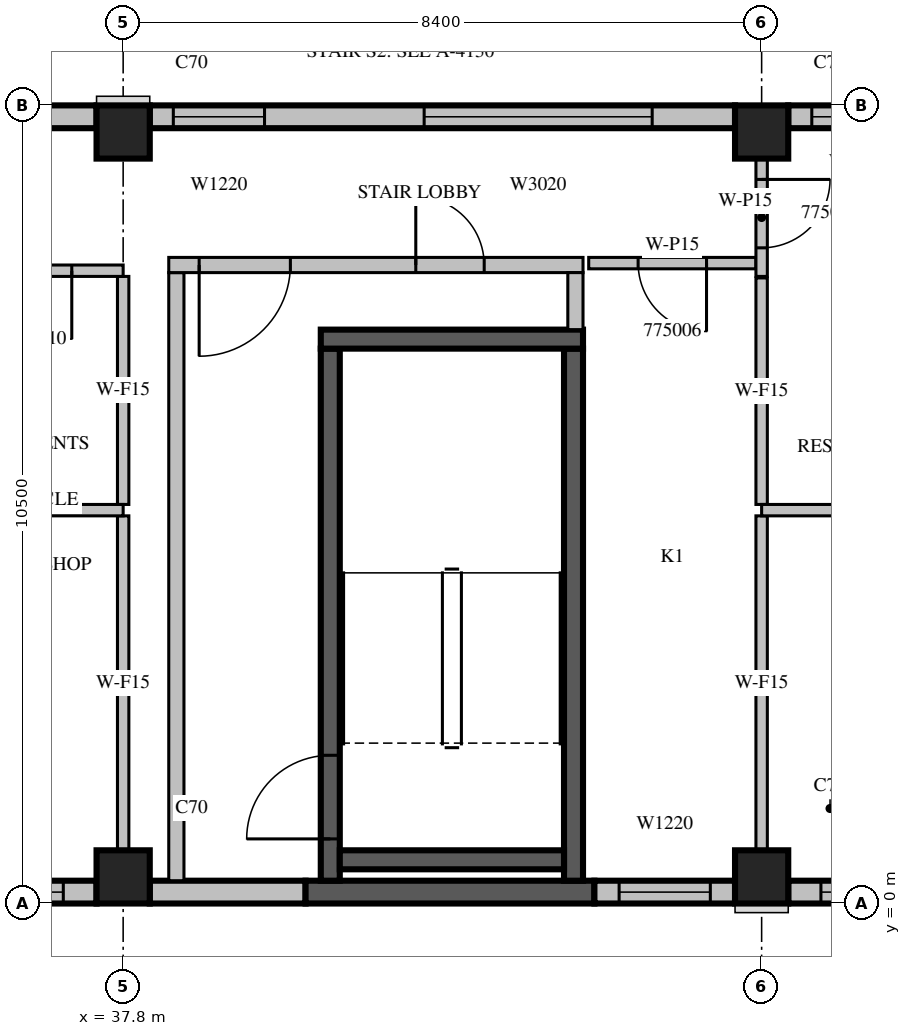
"""IFC4 building model, lengths in metres.
Left out: names, types, materials, properties, quantities, classifications, styles, units other than length and angle.
Written with IfcOpenShell. Run it as: python <this file> out.ifc"""

import sys

from ifc_helpers import new_model, si_unit, direction, frame, frame_2d, origin, origin_2d, place, context, subcontext, project, spatial, rectangle, extrude, source, transform, mapped, element, fill, save


model = new_model("IFC4")
c1 = context("Model", 3, precision=1e-05, world=origin(), true_north=direction((0.0, 1.0)))
c2 = subcontext(c1, "Body", "Model", "MODEL_VIEW")
j1 = project(units=[si_unit("LENGTHUNIT", "METRE"), si_unit("PLANEANGLEUNIT", "RADIAN")], contexts=[c1])
p1 = place(None, origin())
s1 = spatial("IfcSite", under=j1, at=p1, CompositionType="ELEMENT")
p2 = place(p1, origin())
s2 = spatial("IfcBuilding", under=s1, at=p2, CompositionType="ELEMENT")
p3 = place(p2, frame((0.0, 0.0, 323.0)))
s3 = spatial("IfcBuildingStorey", under=s2, at=p3, CompositionType="ELEMENT", Elevation=323.0)
m1 = source(origin(), c2, "Body", "SweptSolid", [
    extrude(rectangle(XDim=0.7, YDim=0.7, at=origin_2d()), origin(), (0.0, 0.0, 1.0), 3.5),
])
for number, where, z_axis, x_axis in (
    (1, (37.8, 0.35, 0.0), (0.0, 0.0, 1.0), (1.0, 0.0, 0.0)),
    (2, (46.2, 0.35, 0.0), (0.0, 0.0, 1.0), (1.0, 0.0, 0.0)),
    (3, (37.8, 10.15, 0.0), (0.0, 0.0, 1.0), (1.0, 0.0, 0.0)),
    (4, (46.2, 10.15, 0.0), (0.0, 0.0, 1.0), (1.0, 0.0, 0.0)),
):
    element("IfcColumn", number, at=place(p3, frame(where, z_axis=z_axis, x_axis=x_axis)), inside=s3, PredefinedType="COLUMN", context=c2, shape_type="MappedRepresentation", body=[
        mapped(m1, transform((0.0, 0.0, 0.0), scale=1.0)),
    ])
m2 = source(origin(), c2, "Body", "SweptSolid", [
    extrude(rectangle(XDim=7.7, YDim=0.3, at=frame_2d((3.85, 0.0))), origin(), (0.0, 0.0, 1.0), 3.1),
])
p4 = place(p3, frame((29.75, 0.15, 0.0), z_axis=(0.0, 0.0, 1.0), x_axis=(1.0, 0.0, 0.0)))
e5 = element("IfcWall", 5, at=p4, inside=s3, PredefinedType="STANDARD", context=c2, shape_type="MappedRepresentation", body=[
    mapped(m2, transform((0.0, 0.0, 0.0), scale=1.0)),
])
m3 = source(origin(), c2, "Body", "SweptSolid", [
    extrude(rectangle(XDim=1.2, YDim=2.0, at=frame_2d((0.6, 1.0))), frame((0.0, 0.16, 0.0), z_axis=(0.0, -1.0, 0.0), x_axis=(1.0, 0.0, 0.0)), (0.0, 0.0, 1.0), 0.32),
])
p5 = place(p4, frame((0.537, 0.0, 0.6)))
e6 = element("IfcOpeningElement", 6, at=p5, cuts=e5, PredefinedType="OPENING", context=c2, shape_type="MappedRepresentation", body=[
    mapped(m3, transform((0.0, 0.0, 0.0), scale=1.0)),
])
p6 = place(p4, frame((6.062, 0.0, 0.6)))
e7 = element("IfcOpeningElement", 7, at=p6, cuts=e5, PredefinedType="OPENING", context=c2, shape_type="MappedRepresentation", body=[
    mapped(m3, transform((0.0, 0.0, 0.0), scale=1.0)),
])
m4 = source(origin(), c2, "Body", "SweptSolid", [
    extrude(rectangle(XDim=2.4, YDim=2.0, at=frame_2d((1.2, 1.0))), frame((0.0, 0.16, 0.0), z_axis=(0.0, -1.0, 0.0), x_axis=(1.0, 0.0, 0.0)), (0.0, 0.0, 1.0), 0.32),
])
p7 = place(p4, frame((2.7, 0.0, 0.6)))
e8 = element("IfcOpeningElement", 8, at=p7, cuts=e5, PredefinedType="OPENING", context=c2, shape_type="MappedRepresentation", body=[
    mapped(m4, transform((0.0, 0.0, 0.0), scale=1.0)),
])
m5 = source(origin(), c2, "Body", "SweptSolid", [
    extrude(rectangle(XDim=2.05, YDim=0.3, at=frame_2d((1.025, 0.0))), origin(), (0.0, 0.0, 1.0), 3.1),
])
p8 = place(p3, frame((38.15, 0.15, 0.0), z_axis=(0.0, 0.0, 1.0), x_axis=(1.0, 0.0, 0.0)))
e9 = element("IfcWall", 9, at=p8, inside=s3, PredefinedType="STANDARD", context=c2, shape_type="MappedRepresentation", body=[
    mapped(m5, transform((0.0, 0.0, 0.0), scale=1.0)),
])
m6 = source(origin(), c2, "Body", "SweptSolid", [
    extrude(rectangle(XDim=3.8, YDim=0.3, at=frame_2d((1.9, 0.0))), origin(), (0.0, 0.0, 1.0), 3.1),
])
p9 = place(p3, frame((40.2, 0.15, 0.0), z_axis=(0.0, 0.0, 1.0), x_axis=(1.0, 0.0, 0.0)))
e10 = element("IfcWall", 10, at=p9, inside=s3, PredefinedType="SOLIDWALL", context=c2, shape_type="MappedRepresentation", body=[
    mapped(m6, transform((0.0, 0.0, 0.0), scale=1.0)),
])
m7 = source(origin(), c2, "Body", "SweptSolid", [
    extrude(rectangle(XDim=1.85, YDim=0.3, at=frame_2d((0.925, 0.0))), origin(), (0.0, 0.0, 1.0), 3.1),
])
p10 = place(p3, frame((44.0, 0.15, 0.0), z_axis=(0.0, 0.0, 1.0), x_axis=(1.0, 0.0, 0.0)))
e11 = element("IfcWall", 11, at=p10, inside=s3, PredefinedType="STANDARD", context=c2, shape_type="MappedRepresentation", body=[
    mapped(m7, transform((0.0, 0.0, 0.0), scale=1.0)),
])
p11 = place(p10, frame((0.325, 0.0, 0.6)))
e12 = element("IfcOpeningElement", 12, at=p11, cuts=e11, PredefinedType="OPENING", context=c2, shape_type="MappedRepresentation", body=[
    mapped(m3, transform((0.0, 0.0, 0.0), scale=1.0)),
])
m8 = source(origin(), c2, "Body", "SweptSolid", [
    extrude(rectangle(XDim=3.01, YDim=0.3, at=frame_2d((1.505, 0.0))), origin(), (0.0, 0.0, 1.0), 3.1),
])
p12 = place(p3, frame((46.55, 0.15, 0.0), z_axis=(0.0, 0.0, 1.0), x_axis=(1.0, 0.0, 0.0)))
e13 = element("IfcWall", 13, at=p12, inside=s3, PredefinedType="STANDARD", context=c2, shape_type="MappedRepresentation", body=[
    mapped(m8, transform((0.0, 0.0, 0.0), scale=1.0)),
])
m9 = source(origin(), c2, "Body", "SweptSolid", [
    extrude(rectangle(XDim=1.8, YDim=2.0, at=frame_2d((0.9, 1.0))), frame((0.0, 0.16, 0.0), z_axis=(0.0, -1.0, 0.0), x_axis=(1.0, 0.0, 0.0)), (0.0, 0.0, 1.0), 0.32),
])
p13 = place(p12, frame((0.43, 0.0, 0.6)))
e14 = element("IfcOpeningElement", 14, at=p13, cuts=e13, PredefinedType="OPENING", context=c2, shape_type="MappedRepresentation", body=[
    mapped(m9, transform((0.0, 0.0, 0.0), scale=1.0)),
])
p14 = place(p3, frame((49.56, 10.35, 0.0), z_axis=(0.0, 0.0, 1.0), x_axis=(-1.0, 0.0, 0.0)))
e15 = element("IfcWall", 15, at=p14, inside=s3, PredefinedType="STANDARD", context=c2, shape_type="MappedRepresentation", body=[
    mapped(m8, transform((0.0, 0.0, 0.0), scale=1.0)),
])
p15 = place(p14, frame((1.5, 0.0, 0.6)))
e16 = element("IfcOpeningElement", 16, at=p15, cuts=e15, PredefinedType="OPENING", context=c2, shape_type="MappedRepresentation", body=[
    mapped(m3, transform((0.0, 0.0, 0.0), scale=1.0)),
])
p16 = place(p3, frame((45.85, 10.35, 0.0), z_axis=(0.0, 0.0, 1.0), x_axis=(-1.0, 0.0, 0.0)))
e17 = element("IfcWall", 17, at=p16, inside=s3, PredefinedType="STANDARD", context=c2, shape_type="MappedRepresentation", body=[
    mapped(m2, transform((0.0, 0.0, 0.0), scale=1.0)),
])
m10 = source(origin(), c2, "Body", "SweptSolid", [
    extrude(rectangle(XDim=3.0, YDim=2.0, at=frame_2d((1.5, 1.0))), frame((0.0, 0.16, 0.0), z_axis=(0.0, -1.0, 0.0), x_axis=(1.0, 0.0, 0.0)), (0.0, 0.0, 1.0), 0.32),
])
p17 = place(p16, frame((1.09, 0.0, 0.6)))
e18 = element("IfcOpeningElement", 18, at=p17, cuts=e17, PredefinedType="OPENING", context=c2, shape_type="MappedRepresentation", body=[
    mapped(m10, transform((0.0, 0.0, 0.0), scale=1.0)),
])
p18 = place(p16, frame((6.19, 0.0, 0.6)))
e19 = element("IfcOpeningElement", 19, at=p18, cuts=e17, PredefinedType="OPENING", context=c2, shape_type="MappedRepresentation", body=[
    mapped(m3, transform((0.0, 0.0, 0.0), scale=1.0)),
])
p19 = place(p3, frame((37.45, 10.35, 0.0), z_axis=(0.0, 0.0, 1.0), x_axis=(-1.0, 0.0, 0.0)))
e20 = element("IfcWall", 20, at=p19, inside=s3, PredefinedType="STANDARD", context=c2, shape_type="MappedRepresentation", body=[
    mapped(m2, transform((0.0, 0.0, 0.0), scale=1.0)),
])
p20 = place(p19, frame((1.09, 0.0, 0.6)))
e21 = element("IfcOpeningElement", 21, at=p20, cuts=e20, PredefinedType="OPENING", context=c2, shape_type="MappedRepresentation", body=[
    mapped(m10, transform((0.0, 0.0, 0.0), scale=1.0)),
])
p21 = place(p19, frame((6.19, 0.0, 0.6)))
e22 = element("IfcOpeningElement", 22, at=p21, cuts=e20, PredefinedType="OPENING", context=c2, shape_type="MappedRepresentation", body=[
    mapped(m3, transform((0.0, 0.0, 0.0), scale=1.0)),
])
m11 = source(origin(), c2, "Body", "SweptSolid", [
    extrude(rectangle(XDim=7.0, YDim=0.25, at=frame_2d((3.5, 0.0))), origin(), (0.0, 0.0, 1.0), 3.1),
])
p22 = place(p3, frame((40.525, 0.3, 0.0), z_axis=(0.0, 0.0, 1.0), x_axis=(0.0, 1.0, 0.0)))
e23 = element("IfcWall", 23, at=p22, inside=s3, PredefinedType="SOLIDWALL", context=c2, shape_type="MappedRepresentation", body=[
    mapped(m11, transform((0.0, 0.0, 0.0), scale=1.0)),
])
m12 = source(origin(), c2, "Body", "SweptSolid", [
    extrude(rectangle(XDim=1.1, YDim=2.1, at=frame_2d((0.55, 1.05))), frame((0.0, 0.135, 0.0), z_axis=(0.0, -1.0, 0.0), x_axis=(1.0, 0.0, 0.0)), (0.0, 0.0, 1.0), 0.27),
])
p23 = place(p22, frame((0.55, 0.0, 0.0)))
e24 = element("IfcOpeningElement", 24, at=p23, cuts=e23, PredefinedType="OPENING", context=c2, shape_type="MappedRepresentation", body=[
    mapped(m12, transform((0.0, 0.0, 0.0), scale=1.0)),
])
p24 = place(p3, frame((43.725, 0.3, 0.0), z_axis=(0.0, 0.0, 1.0), x_axis=(0.0, 1.0, 0.0)))
e25 = element("IfcWall", 25, at=p24, inside=s3, PredefinedType="SOLIDWALL", context=c2, shape_type="MappedRepresentation", body=[
    mapped(m11, transform((0.0, 0.0, 0.0), scale=1.0)),
])
m13 = source(origin(), c2, "Body", "SweptSolid", [
    extrude(rectangle(XDim=3.45, YDim=0.25, at=frame_2d((1.725, 0.0))), origin(), (0.0, 0.0, 1.0), 3.1),
])
p25 = place(p3, frame((40.4, 7.425, 0.0), z_axis=(0.0, 0.0, 1.0), x_axis=(1.0, 0.0, 0.0)))
e26 = element("IfcWall", 26, at=p25, inside=s3, PredefinedType="SOLIDWALL", context=c2, shape_type="MappedRepresentation", body=[
    mapped(m13, transform((0.0, 0.0, 0.0), scale=1.0)),
])
m14 = source(origin(), c2, "Body", "SweptSolid", [
    extrude(rectangle(XDim=2.95, YDim=0.25, at=frame_2d((1.475, 0.0))), origin(), (0.0, 0.0, 1.0), 3.1),
])
p26 = place(p3, frame((40.65, 0.575, 0.0), z_axis=(0.0, 0.0, 1.0), x_axis=(1.0, 0.0, 0.0)))
e27 = element("IfcWall", 27, at=p26, inside=s3, PredefinedType="SOLIDWALL", context=c2, shape_type="MappedRepresentation", body=[
    mapped(m14, transform((0.0, 0.0, 0.0), scale=1.0)),
])
m15 = source(origin(), c2, "Body", "SweptSolid", [
    extrude(rectangle(XDim=8.0, YDim=0.2, at=frame_2d((4.0, 0.0))), origin(), (0.0, 0.0, 1.0), 3.1),
])
p27 = place(p3, frame((38.5, 0.3, 0.0), z_axis=(0.0, 0.0, 1.0), x_axis=(0.0, 1.0, 0.0)))
e28 = element("IfcWall", 28, at=p27, inside=s3, PredefinedType="PARTITIONING", context=c2, shape_type="MappedRepresentation", body=[
    mapped(m15, transform((0.0, 0.0, 0.0), scale=1.0)),
])
m16 = source(origin(), c2, "Body", "SweptSolid", [
    extrude(rectangle(XDim=5.45, YDim=0.2, at=frame_2d((2.725, 0.0))), origin(), (0.0, 0.0, 1.0), 3.1),
])
p28 = place(p3, frame((38.4, 8.4, 0.0), z_axis=(0.0, 0.0, 1.0), x_axis=(1.0, 0.0, 0.0)))
e29 = element("IfcWall", 29, at=p28, inside=s3, PredefinedType="PARTITIONING", context=c2, shape_type="MappedRepresentation", body=[
    mapped(m16, transform((0.0, 0.0, 0.0), scale=1.0)),
])
m17 = source(origin(), c2, "Body", "SweptSolid", [
    extrude(rectangle(XDim=1.2, YDim=2.1, at=frame_2d((0.6, 1.05))), frame((0.0, 0.11, 0.0), z_axis=(0.0, -1.0, 0.0), x_axis=(1.0, 0.0, 0.0)), (0.0, 0.0, 1.0), 0.22),
])
p29 = place(p28, frame((0.4, 0.0, 0.0)))
e30 = element("IfcOpeningElement", 30, at=p29, cuts=e29, PredefinedType="OPENING", context=c2, shape_type="MappedRepresentation", body=[
    mapped(m17, transform((0.0, 0.0, 0.0), scale=1.0)),
])
m18 = source(origin(), c2, "Body", "SweptSolid", [
    extrude(rectangle(XDim=0.9, YDim=2.1, at=frame_2d((0.45, 1.05))), frame((0.0, 0.11, 0.0), z_axis=(0.0, -1.0, 0.0), x_axis=(1.0, 0.0, 0.0)), (0.0, 0.0, 1.0), 0.22),
])
p30 = place(p28, frame((3.25, 0.0, 0.0)))
e31 = element("IfcOpeningElement", 31, at=p30, cuts=e29, PredefinedType="OPENING", context=c2, shape_type="MappedRepresentation", body=[
    mapped(m18, transform((0.0, 0.0, 0.0), scale=1.0)),
])
m19 = source(origin(), c2, "Body", "SweptSolid", [
    extrude(rectangle(XDim=0.75, YDim=0.2, at=frame_2d((0.375, 0.0))), origin(), (0.0, 0.0, 1.0), 3.1),
])
p31 = place(p3, frame((43.75, 7.55, 0.0), z_axis=(0.0, 0.0, 1.0), x_axis=(0.0, 1.0, 0.0)))
e32 = element("IfcWall", 32, at=p31, inside=s3, PredefinedType="PARTITIONING", context=c2, shape_type="MappedRepresentation", body=[
    mapped(m19, transform((0.0, 0.0, 0.0), scale=1.0)),
])
m20 = source(origin(), c2, "Body", "SweptSolid", [
    extrude(rectangle(XDim=2.2, YDim=0.15, at=frame_2d((1.1, 0.0))), origin(), (0.0, 0.0, 1.0), 3.1),
])
p32 = place(p3, frame((46.125, 8.425, 0.0), z_axis=(0.0, 0.0, 1.0), x_axis=(-1.0, 0.0, 0.0)))
e33 = element("IfcWall", 33, at=p32, inside=s3, PredefinedType="PARTITIONING", context=c2, shape_type="MappedRepresentation", body=[
    mapped(m20, transform((0.0, 0.0, 0.0), scale=1.0)),
])
m21 = source(origin(), c2, "Body", "SweptSolid", [
    extrude(rectangle(XDim=0.9, YDim=2.1, at=frame_2d((0.45, 1.05))), frame((0.0, 0.085, 0.0), z_axis=(0.0, -1.0, 0.0), x_axis=(1.0, 0.0, 0.0)), (0.0, 0.0, 1.0), 0.17),
])
p33 = place(p32, frame((0.65, 0.0, 0.0)))
e34 = element("IfcOpeningElement", 34, at=p33, cuts=e33, PredefinedType="OPENING", context=c2, shape_type="MappedRepresentation", body=[
    mapped(m21, transform((0.0, 0.0, 0.0), scale=1.0)),
])
m22 = source(origin(), c2, "Body", "SweptSolid", [
    extrude(rectangle(XDim=4.401, YDim=0.15, at=frame_2d((2.2, 0.0))), origin(), (0.0, 0.0, 1.0), 3.1),
])
p34 = place(p3, frame((37.8, 0.699, 0.0), z_axis=(0.0, 0.0, 1.0), x_axis=(0.0, 1.0, 0.0)))
e35 = element("IfcWall", 35, at=p34, inside=s3, PredefinedType="PARTITIONING", context=c2, shape_type="MappedRepresentation", body=[
    mapped(m22, transform((0.0, 0.0, 0.0), scale=1.0)),
])
m23 = source(origin(), c2, "Body", "SweptSolid", [
    extrude(rectangle(XDim=3.0, YDim=0.15, at=frame_2d((1.5, 0.0))), origin(), (0.0, 0.0, 1.0), 3.1),
])
p35 = place(p3, frame((37.8, 5.25, 0.0), z_axis=(0.0, 0.0, 1.0), x_axis=(0.0, 1.0, 0.0)))
e36 = element("IfcWall", 36, at=p35, inside=s3, PredefinedType="PARTITIONING", context=c2, shape_type="MappedRepresentation", body=[
    mapped(m23, transform((0.0, 0.0, 0.0), scale=1.0)),
])
m24 = source(origin(), c2, "Body", "SweptSolid", [
    extrude(rectangle(XDim=8.4, YDim=0.15, at=frame_2d((4.2, 0.0))), origin(), (0.0, 0.0, 1.0), 3.1),
])
p36 = place(p3, frame((37.8, 5.175, 0.0), z_axis=(0.0, 0.0, 1.0), x_axis=(-1.0, 0.0, 0.0)))
e37 = element("IfcWall", 37, at=p36, inside=s3, PredefinedType="PARTITIONING", context=c2, shape_type="MappedRepresentation", body=[
    mapped(m24, transform((0.0, 0.0, 0.0), scale=1.0)),
])
m25 = source(origin(), c2, "Body", "SweptSolid", [
    extrude(rectangle(XDim=1.2, YDim=2.1, at=frame_2d((0.6, 1.05))), frame((0.0, 0.085, 0.0), z_axis=(0.0, -1.0, 0.0), x_axis=(1.0, 0.0, 0.0)), (0.0, 0.0, 1.0), 0.17),
])
p37 = place(p36, frame((5.648, 0.0, 0.0)))
e38 = element("IfcOpeningElement", 38, at=p37, cuts=e37, PredefinedType="OPENING", context=c2, shape_type="MappedRepresentation", body=[
    mapped(m25, transform((0.0, 0.0, 0.0), scale=1.0)),
])
m26 = source(origin(), c2, "Body", "SweptSolid", [
    extrude(rectangle(XDim=1.551, YDim=0.15, at=frame_2d((0.775, 0.0))), origin(), (0.0, 0.0, 1.0), 3.1),
])
p38 = place(p3, frame((46.2, 9.801, 0.0), z_axis=(0.0, 0.0, 1.0), x_axis=(0.0, -1.0, 0.0)))
e39 = element("IfcWall", 39, at=p38, inside=s3, PredefinedType="PARTITIONING", context=c2, shape_type="MappedRepresentation", body=[
    mapped(m26, transform((0.0, 0.0, 0.0), scale=1.0)),
])
p39 = place(p38, frame((0.275, 0.0, 0.0)))
e40 = element("IfcOpeningElement", 40, at=p39, cuts=e39, PredefinedType="OPENING", context=c2, shape_type="MappedRepresentation", body=[
    mapped(m21, transform((0.0, 0.0, 0.0), scale=1.0)),
])
p40 = place(p3, frame((46.2, 0.699, 0.0), z_axis=(0.0, 0.0, 1.0), x_axis=(0.0, 1.0, 0.0)))
e41 = element("IfcWall", 41, at=p40, inside=s3, PredefinedType="PARTITIONING", context=c2, shape_type="MappedRepresentation", body=[
    mapped(m22, transform((0.0, 0.0, 0.0), scale=1.0)),
])
m27 = source(origin(), c2, "Body", "SweptSolid", [
    extrude(rectangle(XDim=2.98, YDim=0.15, at=frame_2d((1.49, 0.0))), origin(), (0.0, 0.0, 1.0), 3.1),
])
p41 = place(p3, frame((46.2, 5.25, 0.0), z_axis=(0.0, 0.0, 1.0), x_axis=(0.0, 1.0, 0.0)))
e42 = element("IfcWall", 42, at=p41, inside=s3, PredefinedType="PARTITIONING", context=c2, shape_type="MappedRepresentation", body=[
    mapped(m27, transform((0.0, 0.0, 0.0), scale=1.0)),
])
m28 = source(origin(), c2, "Body", "SweptSolid", [
    extrude(rectangle(XDim=3.06, YDim=0.15, at=frame_2d((1.53, 0.0))), origin(), (0.0, 0.0, 1.0), 3.1),
])
p42 = place(p3, frame((49.26, 5.175, 0.0), z_axis=(0.0, 0.0, 1.0), x_axis=(-1.0, 0.0, 0.0)))
e43 = element("IfcWall", 43, at=p42, inside=s3, PredefinedType="PARTITIONING", context=c2, shape_type="MappedRepresentation", body=[
    mapped(m28, transform((0.0, 0.0, 0.0), scale=1.0)),
])
p43 = place(p3, frame((37.8, 8.325, 0.0), z_axis=(0.0, 0.0, 1.0), x_axis=(-1.0, 0.0, 0.0)))
e44 = element("IfcWall", 44, at=p43, inside=s3, PredefinedType="PARTITIONING", context=c2, shape_type="MappedRepresentation", body=[
    mapped(m24, transform((0.0, 0.0, 0.0), scale=1.0)),
])
p44 = place(p43, frame((5.698, 0.0, 0.0)))
e45 = element("IfcOpeningElement", 45, at=p44, cuts=e44, PredefinedType="OPENING", context=c2, shape_type="MappedRepresentation", body=[
    mapped(m25, transform((0.0, 0.0, 0.0), scale=1.0)),
])
p45 = place(p43, frame((2.773, 0.0, 0.0)))
e46 = element("IfcOpeningElement", 46, at=p45, cuts=e44, PredefinedType="OPENING", context=c2, shape_type="MappedRepresentation", body=[
    mapped(m21, transform((0.0, 0.0, 0.0), scale=1.0)),
])
p46 = place(p43, frame((0.676, 0.0, 0.0)))
e47 = element("IfcOpeningElement", 47, at=p46, cuts=e44, PredefinedType="OPENING", context=c2, shape_type="MappedRepresentation", body=[
    mapped(m21, transform((0.0, 0.0, 0.0), scale=1.0)),
])
m29 = source(origin(), c2, "Body", "SweptSolid", [
    extrude(rectangle(XDim=1.2, YDim=2.0, at=frame_2d((0.6, 1.0))), frame((0.0, 0.03, 0.0), z_axis=(0.0, -1.0, 0.0), x_axis=(1.0, 0.0, 0.0)), (0.0, 0.0, 1.0), 0.06),
])
p47 = place(p6, origin())
e48 = element("IfcWindow", 48, at=p47, inside=s3, PartitioningType="SINGLE_PANEL", PredefinedType="WINDOW", context=c2, shape_type="MappedRepresentation", body=[
    mapped(m29, transform((0.0, 0.0, 0.0), scale=1.0)),
])
fill(e7, e48)
p48 = place(p11, origin())
e49 = element("IfcWindow", 49, at=p48, inside=s3, PartitioningType="SINGLE_PANEL", PredefinedType="WINDOW", context=c2, shape_type="MappedRepresentation", body=[
    mapped(m29, transform((0.0, 0.0, 0.0), scale=1.0)),
])
fill(e12, e49)
m30 = source(origin(), c2, "Body", "SweptSolid", [
    extrude(rectangle(XDim=1.8, YDim=2.0, at=frame_2d((0.9, 1.0))), frame((0.0, 0.03, 0.0), z_axis=(0.0, -1.0, 0.0), x_axis=(1.0, 0.0, 0.0)), (0.0, 0.0, 1.0), 0.06),
])
p49 = place(p13, origin())
e50 = element("IfcWindow", 50, at=p49, inside=s3, PartitioningType="SINGLE_PANEL", PredefinedType="WINDOW", context=c2, shape_type="MappedRepresentation", body=[
    mapped(m30, transform((0.0, 0.0, 0.0), scale=1.0)),
])
fill(e14, e50)
p50 = place(p15, origin())
e51 = element("IfcWindow", 51, at=p50, inside=s3, PartitioningType="SINGLE_PANEL", PredefinedType="WINDOW", context=c2, shape_type="MappedRepresentation", body=[
    mapped(m29, transform((0.0, 0.0, 0.0), scale=1.0)),
])
fill(e16, e51)
m31 = source(origin(), c2, "Body", "SweptSolid", [
    extrude(rectangle(XDim=3.0, YDim=2.0, at=frame_2d((1.5, 1.0))), frame((0.0, 0.03, 0.0), z_axis=(0.0, -1.0, 0.0), x_axis=(1.0, 0.0, 0.0)), (0.0, 0.0, 1.0), 0.06),
])
p51 = place(p17, origin())
e52 = element("IfcWindow", 52, at=p51, inside=s3, PartitioningType="SINGLE_PANEL", PredefinedType="WINDOW", context=c2, shape_type="MappedRepresentation", body=[
    mapped(m31, transform((0.0, 0.0, 0.0), scale=1.0)),
])
fill(e18, e52)
p52 = place(p18, origin())
e53 = element("IfcWindow", 53, at=p52, inside=s3, PartitioningType="SINGLE_PANEL", PredefinedType="WINDOW", context=c2, shape_type="MappedRepresentation", body=[
    mapped(m29, transform((0.0, 0.0, 0.0), scale=1.0)),
])
fill(e19, e53)
m32 = source(origin(), c2, "Body", "SweptSolid", [
    extrude(rectangle(XDim=1.1, YDim=2.1, at=frame_2d((0.55, 1.05))), frame((0.0, 0.025, 0.0), z_axis=(0.0, -1.0, 0.0), x_axis=(1.0, 0.0, 0.0)), (0.0, 0.0, 1.0), 0.05),
])
p53 = place(p23, origin())
e54 = element("IfcDoor", 54, at=p53, inside=s3, OperationType="SINGLE_SWING_LEFT", PredefinedType="DOOR", context=c2, shape_type="MappedRepresentation", body=[
    mapped(m32, transform((0.0, 0.0, 0.0), scale=1.0)),
])
fill(e24, e54)
m33 = source(origin(), c2, "Body", "SweptSolid", [
    extrude(rectangle(XDim=1.2, YDim=2.1, at=frame_2d((0.6, 1.05))), frame((0.0, 0.025, 0.0), z_axis=(0.0, -1.0, 0.0), x_axis=(1.0, 0.0, 0.0)), (0.0, 0.0, 1.0), 0.05),
])
p54 = place(p29, origin())
e55 = element("IfcDoor", 55, at=p54, inside=s3, OperationType="SINGLE_SWING_RIGHT", PredefinedType="DOOR", context=c2, shape_type="MappedRepresentation", body=[
    mapped(m33, transform((0.0, 0.0, 0.0), scale=1.0)),
])
fill(e30, e55)
m34 = source(origin(), c2, "Body", "SweptSolid", [
    extrude(rectangle(XDim=0.9, YDim=2.1, at=frame_2d((0.45, 1.05))), frame((0.0, 0.025, 0.0), z_axis=(0.0, -1.0, 0.0), x_axis=(1.0, 0.0, 0.0)), (0.0, 0.0, 1.0), 0.05),
])
p55 = place(p30, origin())
e56 = element("IfcDoor", 56, at=p55, inside=s3, OperationType="SINGLE_SWING_LEFT", PredefinedType="DOOR", context=c2, shape_type="MappedRepresentation", body=[
    mapped(m34, transform((0.0, 0.0, 0.0), scale=1.0)),
])
fill(e31, e56)
p56 = place(p33, origin())
e57 = element("IfcDoor", 57, at=p56, inside=s3, OperationType="SINGLE_SWING_LEFT", PredefinedType="DOOR", context=c2, shape_type="MappedRepresentation", body=[
    mapped(m34, transform((0.0, 0.0, 0.0), scale=1.0)),
])
fill(e34, e57)
p57 = place(p46, origin())
e58 = element("IfcDoor", 58, at=p57, inside=s3, OperationType="SINGLE_SWING_LEFT", PredefinedType="DOOR", context=c2, shape_type="MappedRepresentation", body=[
    mapped(m34, transform((0.0, 0.0, 0.0), scale=1.0)),
])
fill(e47, e58)
p58 = place(p39, origin())
e59 = element("IfcDoor", 59, at=p58, inside=s3, OperationType="SINGLE_SWING_LEFT", PredefinedType="DOOR", context=c2, shape_type="MappedRepresentation", body=[
    mapped(m34, transform((0.0, 0.0, 0.0), scale=1.0)),
])
fill(e40, e59)
save(model, sys.argv[1])
